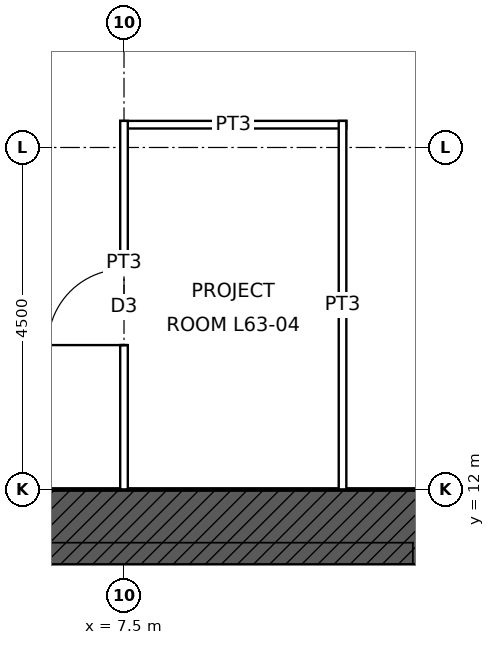
"""IFC4 building model, lengths in metres.
Left out: names, types, materials, properties, quantities, classifications, styles, units other than length and angle.
Written with IfcOpenShell. Run it as: python <this file> out.ifc"""

import sys

from ifc_helpers import new_model, si_unit, direction, frame, frame_2d, origin, place, context, subcontext, project, spatial, rectangle, extrude, element, fill, save


model = new_model("IFC4")
c1 = context("Model", 3, precision=1e-05, world=origin(), true_north=direction((0.0, 1.0)))
c2 = subcontext(c1, "Body", "Model", "MODEL_VIEW")
j1 = project(units=[si_unit("LENGTHUNIT", "METRE"), si_unit("PLANEANGLEUNIT", "RADIAN")], contexts=[c1])
p1 = place(None, origin())
s1 = spatial("IfcSite", under=j1, at=p1, CompositionType="ELEMENT")
p2 = place(p1, origin())
s2 = spatial("IfcBuilding", under=s1, at=p2, CompositionType="ELEMENT")
p3 = place(p2, frame((0.0, 0.0, 287.9)))
s3 = spatial("IfcBuildingStorey", under=s2, at=p3, CompositionType="ELEMENT", Elevation=287.9)
p4 = place(p3, frame((-12.0, 11.5, 0.0), z_axis=(0.0, 0.0, 1.0), x_axis=(1.0, 0.0, 0.0)))
e1 = element("IfcWall", 1, at=p4, inside=s3, PredefinedType="SHEAR", context=c2, shape_type="SweptSolid", body=[
    extrude(rectangle(XDim=24.0, YDim=1.0, at=frame_2d((12.0, 0.0))), origin(), (0.0, 0.0, 1.0), 4.0),
])
p5 = place(p4, frame((6.25, 0.0, 0.0)))
e2 = element("IfcOpeningElement", 2, at=p5, cuts=e1, PredefinedType="OPENING", context=c2, shape_type="SweptSolid", body=[
    extrude(rectangle(XDim=1.0, YDim=2.4, at=frame_2d((0.5, 1.2))), frame((0.0, 0.51, 0.0), z_axis=(0.0, -1.0, 0.0), x_axis=(1.0, 0.0, 0.0)), (0.0, 0.0, 1.0), 1.02),
])
p6 = place(p4, frame((16.75, 0.0, 0.0)))
e3 = element("IfcOpeningElement", 3, at=p6, cuts=e1, PredefinedType="OPENING", context=c2, shape_type="SweptSolid", body=[
    extrude(rectangle(XDim=1.0, YDim=2.4, at=frame_2d((0.5, 1.2))), frame((0.0, 0.51, 0.0), z_axis=(0.0, -1.0, 0.0), x_axis=(1.0, 0.0, 0.0)), (0.0, 0.0, 1.0), 1.02),
])
p7 = place(p3, frame((7.45, 16.8, 0.0), z_axis=(0.0, 0.0, 1.0), x_axis=(1.0, 0.0, 0.0)))
e4 = element("IfcWall", 4, at=p7, inside=s3, PredefinedType="PARTITIONING", context=c2, shape_type="SweptSolid", body=[
    extrude(rectangle(XDim=2.975, YDim=0.1, at=frame_2d((1.488, 0.0))), origin(), (0.0, 0.0, 1.0), 3.85),
])
p8 = place(p3, frame((7.5, 12.0, 0.0), z_axis=(0.0, 0.0, 1.0), x_axis=(0.0, 1.0, 0.0)))
e5 = element("IfcWall", 5, at=p8, inside=s3, PredefinedType="PARTITIONING", context=c2, shape_type="SweptSolid", body=[
    extrude(rectangle(XDim=4.85, YDim=0.1, at=frame_2d((2.425, 0.0))), origin(), (0.0, 0.0, 1.0), 3.243),
])
p9 = place(p8, frame((1.9, 0.0, 0.0)))
e6 = element("IfcOpeningElement", 6, at=p9, cuts=e5, PredefinedType="OPENING", context=c2, shape_type="SweptSolid", body=[
    extrude(rectangle(XDim=1.0, YDim=2.1, at=frame_2d((0.5, 1.05))), frame((0.0, 0.06, 0.0), z_axis=(0.0, -1.0, 0.0), x_axis=(1.0, 0.0, 0.0)), (0.0, 0.0, 1.0), 0.12),
])
p10 = place(p3, frame((10.375, 12.0, 0.0), z_axis=(0.0, 0.0, 1.0), x_axis=(0.0, 1.0, 0.0)))
e7 = element("IfcWall", 7, at=p10, inside=s3, PredefinedType="PARTITIONING", context=c2, shape_type="SweptSolid", body=[
    extrude(rectangle(XDim=4.85, YDim=0.1, at=frame_2d((2.425, 0.0))), origin(), (0.0, 0.0, 1.0), 3.85),
])
p11 = place(p9, origin())
e8 = element("IfcDoor", 8, at=p11, inside=s3, OperationType="SINGLE_SWING_LEFT", PredefinedType="DOOR", context=c2, shape_type="SweptSolid", body=[
    extrude(rectangle(XDim=1.0, YDim=2.1, at=frame_2d((0.5, 1.05))), frame((0.0, 0.025, 0.0), z_axis=(0.0, -1.0, 0.0), x_axis=(1.0, 0.0, 0.0)), (0.0, 0.0, 1.0), 0.05),
])
fill(e6, e8)
save(model, sys.argv[1])
